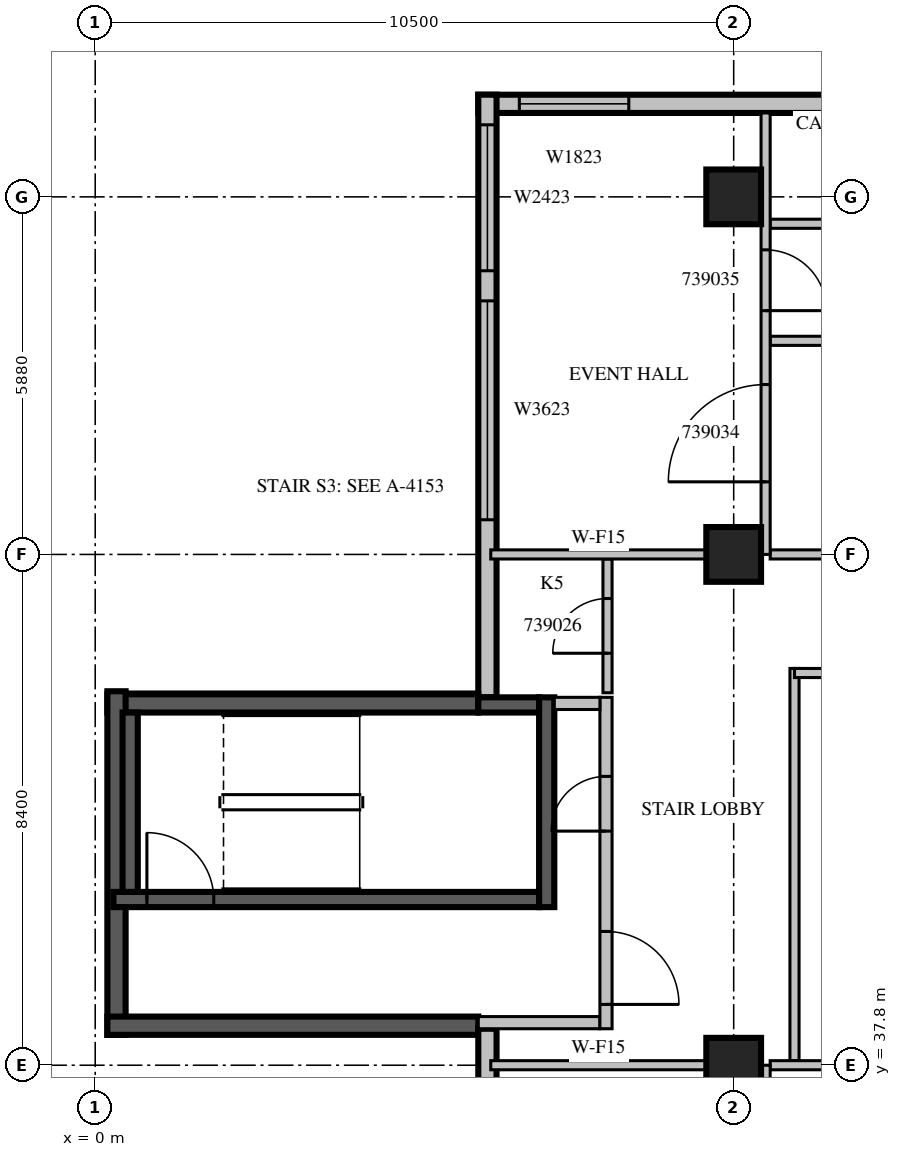
"""IFC4 building model, lengths in metres.
Left out: names, types, materials, properties, quantities, classifications, styles, units other than length and angle.
Written with IfcOpenShell. Run it as: python <this file> out.ifc"""

import sys

from ifc_helpers import new_model, si_unit, direction, frame, frame_2d, origin, origin_2d, place, context, subcontext, project, spatial, rectangle, extrude, source, transform, mapped, element, fill, save


model = new_model("IFC4")
c1 = context("Model", 3, precision=1e-05, world=origin(), true_north=direction((0.0, 1.0)))
c2 = subcontext(c1, "Body", "Model", "MODEL_VIEW")
j1 = project(units=[si_unit("LENGTHUNIT", "METRE"), si_unit("PLANEANGLEUNIT", "RADIAN")], contexts=[c1])
p1 = place(None, origin())
s1 = spatial("IfcSite", under=j1, at=p1, CompositionType="ELEMENT")
p2 = place(p1, origin())
s2 = spatial("IfcBuilding", under=s1, at=p2, CompositionType="ELEMENT")
p3 = place(p2, frame((0.0, 0.0, 181.6)))
s3 = spatial("IfcBuildingStorey", under=s2, at=p3, CompositionType="ELEMENT", Elevation=181.6)
m1 = source(origin(), c2, "Body", "SweptSolid", [
    extrude(rectangle(XDim=0.9, YDim=0.9, at=origin_2d()), origin(), (0.0, 0.0, 1.0), 3.8),
])
for number, where, z_axis, x_axis in (
    (1, (10.5, 37.8, 0.0), (0.0, 0.0, 1.0), (1.0, 0.0, 0.0)),
    (2, (10.5, 46.2, 0.0), (0.0, 0.0, 1.0), (1.0, 0.0, 0.0)),
    (3, (10.5, 52.08, 0.0), (0.0, 0.0, 1.0), (1.0, 0.0, 0.0)),
):
    element("IfcColumn", number, at=place(p3, frame(where, z_axis=z_axis, x_axis=x_axis)), inside=s3, PredefinedType="COLUMN", context=c2, shape_type="MappedRepresentation", body=[
        mapped(m1, transform((0.0, 0.0, 0.0), scale=1.0)),
    ])
m2 = source(origin(), c2, "Body", "SweptSolid", [
    extrude(rectangle(XDim=10.5, YDim=0.3, at=frame_2d((5.25, 0.0))), origin(), (0.0, 0.0, 1.0), 3.4),
])
p4 = place(p3, frame((16.8, 53.61, 0.0), z_axis=(0.0, 0.0, 1.0), x_axis=(-1.0, 0.0, 0.0)))
e4 = element("IfcWall", 4, at=p4, inside=s3, PredefinedType="STANDARD", context=c2, shape_type="MappedRepresentation", body=[
    mapped(m2, transform((0.0, 0.0, 0.0), scale=1.0)),
])
m3 = source(origin(), c2, "Body", "SweptSolid", [
    extrude(rectangle(XDim=1.2, YDim=2.3, at=frame_2d((0.6, 1.15))), frame((0.0, 0.16, 0.0), z_axis=(0.0, -1.0, 0.0), x_axis=(1.0, 0.0, 0.0)), (0.0, 0.0, 1.0), 0.32),
])
p5 = place(p4, frame((2.15, 0.0, 0.6)))
e5 = element("IfcOpeningElement", 5, at=p5, cuts=e4, PredefinedType="OPENING", context=c2, shape_type="MappedRepresentation", body=[
    mapped(m3, transform((0.0, 0.0, 0.0), scale=1.0)),
])
m4 = source(origin(), c2, "Body", "SweptSolid", [
    extrude(rectangle(XDim=1.8, YDim=2.3, at=frame_2d((0.9, 1.15))), frame((0.0, 0.16, 0.0), z_axis=(0.0, -1.0, 0.0), x_axis=(1.0, 0.0, 0.0)), (0.0, 0.0, 1.0), 0.32),
])
p6 = place(p4, frame((8.025, 0.0, 0.6)))
e6 = element("IfcOpeningElement", 6, at=p6, cuts=e4, PredefinedType="OPENING", context=c2, shape_type="MappedRepresentation", body=[
    mapped(m4, transform((0.0, 0.0, 0.0), scale=1.0)),
])
m5 = source(origin(), c2, "Body", "SweptSolid", [
    extrude(rectangle(XDim=9.91, YDim=0.3, at=frame_2d((4.955, 0.0))), origin(), (0.0, 0.0, 1.0), 3.4),
])
p7 = place(p3, frame((6.45, 53.76, 0.0), z_axis=(0.0, 0.0, 1.0), x_axis=(0.0, -1.0, 0.0)))
e7 = element("IfcWall", 7, at=p7, inside=s3, PredefinedType="STANDARD", context=c2, shape_type="MappedRepresentation", body=[
    mapped(m5, transform((0.0, 0.0, 0.0), scale=1.0)),
])
m6 = source(origin(), c2, "Body", "SweptSolid", [
    extrude(rectangle(XDim=3.6, YDim=2.3, at=frame_2d((1.8, 1.15))), frame((0.0, 0.16, 0.0), z_axis=(0.0, -1.0, 0.0), x_axis=(1.0, 0.0, 0.0)), (0.0, 0.0, 1.0), 0.32),
])
p8 = place(p7, frame((3.39, 0.0, 0.6)))
e8 = element("IfcOpeningElement", 8, at=p8, cuts=e7, PredefinedType="OPENING", context=c2, shape_type="MappedRepresentation", body=[
    mapped(m6, transform((0.0, 0.0, 0.0), scale=1.0)),
])
m7 = source(origin(), c2, "Body", "SweptSolid", [
    extrude(rectangle(XDim=2.4, YDim=2.3, at=frame_2d((1.2, 1.15))), frame((0.0, 0.16, 0.0), z_axis=(0.0, -1.0, 0.0), x_axis=(1.0, 0.0, 0.0)), (0.0, 0.0, 1.0), 0.32),
])
p9 = place(p7, frame((0.495, 0.0, 0.6)))
e9 = element("IfcOpeningElement", 9, at=p9, cuts=e7, PredefinedType="OPENING", context=c2, shape_type="MappedRepresentation", body=[
    mapped(m7, transform((0.0, 0.0, 0.0), scale=1.0)),
])
m8 = source(origin(), c2, "Body", "SweptSolid", [
    extrude(rectangle(XDim=6.1, YDim=0.3, at=frame_2d((3.05, 0.0))), origin(), (0.0, 0.0, 1.0), 3.4),
])
p10 = place(p3, frame((6.3, 43.75, 0.0), z_axis=(0.0, 0.0, 1.0), x_axis=(-1.0, 0.0, 0.0)))
e10 = element("IfcWall", 10, at=p10, inside=s3, PredefinedType="SOLIDWALL", context=c2, shape_type="MappedRepresentation", body=[
    mapped(m8, transform((0.0, 0.0, 0.0), scale=1.0)),
])
m9 = source(origin(), c2, "Body", "SweptSolid", [
    extrude(rectangle(XDim=5.65, YDim=0.3, at=frame_2d((2.825, 0.0))), origin(), (0.0, 0.0, 1.0), 3.4),
])
p11 = place(p3, frame((0.35, 43.95, 0.0), z_axis=(0.0, 0.0, 1.0), x_axis=(0.0, -1.0, 0.0)))
e11 = element("IfcWall", 11, at=p11, inside=s3, PredefinedType="SOLIDWALL", context=c2, shape_type="MappedRepresentation", body=[
    mapped(m9, transform((0.0, 0.0, 0.0), scale=1.0)),
])
p12 = place(p3, frame((0.2, 38.45, 0.0), z_axis=(0.0, 0.0, 1.0), x_axis=(1.0, 0.0, 0.0)))
e12 = element("IfcWall", 12, at=p12, inside=s3, PredefinedType="SOLIDWALL", context=c2, shape_type="MappedRepresentation", body=[
    mapped(m8, transform((0.0, 0.0, 0.0), scale=1.0)),
])
m10 = source(origin(), c2, "Body", "SweptSolid", [
    extrude(rectangle(XDim=4.2, YDim=0.3, at=frame_2d((2.1, 0.0))), origin(), (0.0, 0.0, 1.0), 3.4),
])
p13 = place(p3, frame((6.45, 38.4, 0.0), z_axis=(0.0, 0.0, 1.0), x_axis=(0.0, -1.0, 0.0)))
e13 = element("IfcWall", 13, at=p13, inside=s3, PredefinedType="STANDARD", context=c2, shape_type="MappedRepresentation", body=[
    mapped(m10, transform((0.0, 0.0, 0.0), scale=1.0)),
])
p14 = place(p13, frame((1.15, 0.0, 0.6)))
e14 = element("IfcOpeningElement", 14, at=p14, cuts=e13, PredefinedType="OPENING", context=c2, shape_type="MappedRepresentation", body=[
    mapped(m4, transform((0.0, 0.0, 0.0), scale=1.0)),
])
m11 = source(origin(), c2, "Body", "SweptSolid", [
    extrude(rectangle(XDim=7.0, YDim=0.25, at=frame_2d((3.5, 0.0))), origin(), (0.0, 0.0, 1.0), 3.4),
])
p15 = place(p3, frame((0.3, 40.525, 0.0), z_axis=(0.0, 0.0, 1.0), x_axis=(1.0, 0.0, 0.0)))
e15 = element("IfcWall", 15, at=p15, inside=s3, PredefinedType="SOLIDWALL", context=c2, shape_type="MappedRepresentation", body=[
    mapped(m11, transform((0.0, 0.0, 0.0), scale=1.0)),
])
m12 = source(origin(), c2, "Body", "SweptSolid", [
    extrude(rectangle(XDim=1.1, YDim=2.1, at=frame_2d((0.55, 1.05))), frame((0.0, 0.135, 0.0), z_axis=(0.0, -1.0, 0.0), x_axis=(1.0, 0.0, 0.0)), (0.0, 0.0, 1.0), 0.27),
])
p16 = place(p15, frame((0.55, 0.0, 0.0)))
e16 = element("IfcOpeningElement", 16, at=p16, cuts=e15, PredefinedType="OPENING", context=c2, shape_type="MappedRepresentation", body=[
    mapped(m12, transform((0.0, 0.0, 0.0), scale=1.0)),
])
m13 = source(origin(), c2, "Body", "SweptSolid", [
    extrude(rectangle(XDim=1.0, YDim=0.25, at=frame_2d((0.5, 0.0))), origin(), (0.0, 0.0, 1.0), 3.4),
])
p17 = place(p3, frame((6.3, 43.725, 0.0), z_axis=(0.0, 0.0, 1.0), x_axis=(1.0, 0.0, 0.0)))
e17 = element("IfcWall", 17, at=p17, inside=s3, PredefinedType="SOLIDWALL", context=c2, shape_type="MappedRepresentation", body=[
    mapped(m13, transform((0.0, 0.0, 0.0), scale=1.0)),
])
m14 = source(origin(), c2, "Body", "SweptSolid", [
    extrude(rectangle(XDim=3.45, YDim=0.25, at=frame_2d((1.725, 0.0))), origin(), (0.0, 0.0, 1.0), 3.4),
])
p18 = place(p3, frame((7.425, 40.4, 0.0), z_axis=(0.0, 0.0, 1.0), x_axis=(0.0, 1.0, 0.0)))
e18 = element("IfcWall", 18, at=p18, inside=s3, PredefinedType="SOLIDWALL", context=c2, shape_type="MappedRepresentation", body=[
    mapped(m14, transform((0.0, 0.0, 0.0), scale=1.0)),
])
m15 = source(origin(), c2, "Body", "SweptSolid", [
    extrude(rectangle(XDim=2.95, YDim=0.25, at=frame_2d((1.475, 0.0))), origin(), (0.0, 0.0, 1.0), 3.4),
])
p19 = place(p3, frame((0.575, 40.65, 0.0), z_axis=(0.0, 0.0, 1.0), x_axis=(0.0, 1.0, 0.0)))
e19 = element("IfcWall", 19, at=p19, inside=s3, PredefinedType="SOLIDWALL", context=c2, shape_type="MappedRepresentation", body=[
    mapped(m15, transform((0.0, 0.0, 0.0), scale=1.0)),
])
m16 = source(origin(), c2, "Body", "SweptSolid", [
    extrude(rectangle(XDim=2.0, YDim=0.2, at=frame_2d((1.0, 0.0))), origin(), (0.0, 0.0, 1.0), 3.4),
])
p20 = place(p3, frame((6.3, 38.5, 0.0), z_axis=(0.0, 0.0, 1.0), x_axis=(1.0, 0.0, 0.0)))
e20 = element("IfcWall", 20, at=p20, inside=s3, PredefinedType="PARTITIONING", context=c2, shape_type="MappedRepresentation", body=[
    mapped(m16, transform((0.0, 0.0, 0.0), scale=1.0)),
])
m17 = source(origin(), c2, "Body", "SweptSolid", [
    extrude(rectangle(XDim=5.45, YDim=0.2, at=frame_2d((2.725, 0.0))), origin(), (0.0, 0.0, 1.0), 3.4),
])
p21 = place(p3, frame((8.4, 38.4, 0.0), z_axis=(0.0, 0.0, 1.0), x_axis=(0.0, 1.0, 0.0)))
e21 = element("IfcWall", 21, at=p21, inside=s3, PredefinedType="PARTITIONING", context=c2, shape_type="MappedRepresentation", body=[
    mapped(m17, transform((0.0, 0.0, 0.0), scale=1.0)),
])
m18 = source(origin(), c2, "Body", "SweptSolid", [
    extrude(rectangle(XDim=1.2, YDim=2.1, at=frame_2d((0.6, 1.05))), frame((0.0, 0.11, 0.0), z_axis=(0.0, -1.0, 0.0), x_axis=(1.0, 0.0, 0.0)), (0.0, 0.0, 1.0), 0.22),
])
p22 = place(p21, frame((0.4, 0.0, 0.0)))
e22 = element("IfcOpeningElement", 22, at=p22, cuts=e21, PredefinedType="OPENING", context=c2, shape_type="MappedRepresentation", body=[
    mapped(m18, transform((0.0, 0.0, 0.0), scale=1.0)),
])
m19 = source(origin(), c2, "Body", "SweptSolid", [
    extrude(rectangle(XDim=0.9, YDim=2.1, at=frame_2d((0.45, 1.05))), frame((0.0, 0.11, 0.0), z_axis=(0.0, -1.0, 0.0), x_axis=(1.0, 0.0, 0.0)), (0.0, 0.0, 1.0), 0.22),
])
p23 = place(p21, frame((3.25, 0.0, 0.0)))
e23 = element("IfcOpeningElement", 23, at=p23, cuts=e21, PredefinedType="OPENING", context=c2, shape_type="MappedRepresentation", body=[
    mapped(m19, transform((0.0, 0.0, 0.0), scale=1.0)),
])
m20 = source(origin(), c2, "Body", "SweptSolid", [
    extrude(rectangle(XDim=0.75, YDim=0.2, at=frame_2d((0.375, 0.0))), origin(), (0.0, 0.0, 1.0), 3.4),
])
p24 = place(p3, frame((7.55, 43.75, 0.0), z_axis=(0.0, 0.0, 1.0), x_axis=(1.0, 0.0, 0.0)))
e24 = element("IfcWall", 24, at=p24, inside=s3, PredefinedType="PARTITIONING", context=c2, shape_type="MappedRepresentation", body=[
    mapped(m20, transform((0.0, 0.0, 0.0), scale=1.0)),
])
m21 = source(origin(), c2, "Body", "SweptSolid", [
    extrude(rectangle(XDim=6.45, YDim=0.15, at=frame_2d((3.225, 0.0))), origin(), (0.0, 0.0, 1.0), 3.4),
])
p25 = place(p3, frame((11.5, 44.325, 0.0), z_axis=(0.0, 0.0, 1.0), x_axis=(0.0, -1.0, 0.0)))
e25 = element("IfcWall", 25, at=p25, inside=s3, PredefinedType="PARTITIONING", context=c2, shape_type="MappedRepresentation", body=[
    mapped(m21, transform((0.0, 0.0, 0.0), scale=1.0)),
])
m22 = source(origin(), c2, "Body", "SweptSolid", [
    extrude(rectangle(XDim=3.575, YDim=0.15, at=frame_2d((1.788, 0.0))), origin(), (0.0, 0.0, 1.0), 3.4),
])
p26 = place(p3, frame((15.075, 44.25, 0.0), z_axis=(0.0, 0.0, 1.0), x_axis=(-1.0, 0.0, 0.0)))
e26 = element("IfcWall", 26, at=p26, inside=s3, PredefinedType="PARTITIONING", context=c2, shape_type="MappedRepresentation", body=[
    mapped(m22, transform((0.0, 0.0, 0.0), scale=1.0)),
])
m23 = source(origin(), c2, "Body", "SweptSolid", [
    extrude(rectangle(XDim=2.2, YDim=0.15, at=frame_2d((1.1, 0.0))), origin(), (0.0, 0.0, 1.0), 3.4),
])
p27 = place(p3, frame((8.425, 43.925, 0.0), z_axis=(0.0, 0.0, 1.0), x_axis=(0.0, 1.0, 0.0)))
e27 = element("IfcWall", 27, at=p27, inside=s3, PredefinedType="PARTITIONING", context=c2, shape_type="MappedRepresentation", body=[
    mapped(m23, transform((0.0, 0.0, 0.0), scale=1.0)),
])
m24 = source(origin(), c2, "Body", "SweptSolid", [
    extrude(rectangle(XDim=0.9, YDim=2.1, at=frame_2d((0.45, 1.05))), frame((0.0, 0.085, 0.0), z_axis=(0.0, -1.0, 0.0), x_axis=(1.0, 0.0, 0.0)), (0.0, 0.0, 1.0), 0.17),
])
p28 = place(p27, frame((0.65, 0.0, 0.0)))
e28 = element("IfcOpeningElement", 28, at=p28, cuts=e27, PredefinedType="OPENING", context=c2, shape_type="MappedRepresentation", body=[
    mapped(m24, transform((0.0, 0.0, 0.0), scale=1.0)),
])
m25 = source(origin(), c2, "Body", "SweptSolid", [
    extrude(rectangle(XDim=3.546, YDim=0.15, at=frame_2d((1.773, 0.0))), origin(), (0.0, 0.0, 1.0), 3.4),
])
p29 = place(p3, frame((10.051, 37.8, 0.0), z_axis=(0.0, 0.0, 1.0), x_axis=(-1.0, 0.0, 0.0)))
e29 = element("IfcWall", 29, at=p29, inside=s3, PredefinedType="PARTITIONING", context=c2, shape_type="MappedRepresentation", body=[
    mapped(m25, transform((0.0, 0.0, 0.0), scale=1.0)),
])
m26 = source(origin(), c2, "Body", "SweptSolid", [
    extrude(rectangle(XDim=3.9, YDim=0.15, at=frame_2d((1.95, 0.0))), origin(), (0.0, 0.0, 1.0), 3.4),
])
p30 = place(p3, frame((15.0, 37.8, 0.0), z_axis=(0.0, 0.0, 1.0), x_axis=(-1.0, 0.0, 0.0)))
e30 = element("IfcWall", 30, at=p30, inside=s3, PredefinedType="PARTITIONING", context=c2, shape_type="MappedRepresentation", body=[
    mapped(m26, transform((0.0, 0.0, 0.0), scale=1.0)),
])
m27 = source(origin(), c2, "Body", "SweptSolid", [
    extrude(rectangle(XDim=8.4, YDim=0.15, at=frame_2d((4.2, 0.0))), origin(), (0.0, 0.0, 1.0), 3.4),
])
p31 = place(p3, frame((11.025, 29.4, 0.0), z_axis=(0.0, 0.0, 1.0), x_axis=(0.0, 1.0, 0.0)))
e31 = element("IfcWall", 31, at=p31, inside=s3, PredefinedType="PARTITIONING", context=c2, shape_type="MappedRepresentation", body=[
    mapped(m27, transform((0.0, 0.0, 0.0), scale=1.0)),
])
p32 = place(p31, frame((1.418, 0.0, 0.0)))
e32 = element("IfcOpeningElement", 32, at=p32, cuts=e31, PredefinedType="OPENING", context=c2, shape_type="MappedRepresentation", body=[
    mapped(m24, transform((0.0, 0.0, 0.0), scale=1.0)),
])
p33 = place(p31, frame((0.46, 0.0, 0.0)))
e33 = element("IfcOpeningElement", 33, at=p33, cuts=e31, PredefinedType="OPENING", context=c2, shape_type="MappedRepresentation", body=[
    mapped(m24, transform((0.0, 0.0, 0.0), scale=1.0)),
])
p34 = place(p31, frame((4.525, 0.0, 0.0)))
e34 = element("IfcOpeningElement", 34, at=p34, cuts=e31, PredefinedType="OPENING", context=c2, shape_type="MappedRepresentation", body=[
    mapped(m24, transform((0.0, 0.0, 0.0), scale=1.0)),
])
p35 = place(p31, frame((6.387, 0.0, 0.0)))
e35 = element("IfcOpeningElement", 35, at=p35, cuts=e31, PredefinedType="OPENING", context=c2, shape_type="MappedRepresentation", body=[
    mapped(m24, transform((0.0, 0.0, 0.0), scale=1.0)),
])
p36 = place(p3, frame((15.0, 49.713, 0.0), z_axis=(0.0, 0.0, 1.0), x_axis=(-1.0, 0.0, 0.0)))
e36 = element("IfcWall", 36, at=p36, inside=s3, PredefinedType="PARTITIONING", context=c2, shape_type="MappedRepresentation", body=[
    mapped(m26, transform((0.0, 0.0, 0.0), scale=1.0)),
])
p37 = place(p3, frame((15.0, 51.638, 0.0), z_axis=(0.0, 0.0, 1.0), x_axis=(-1.0, 0.0, 0.0)))
e37 = element("IfcWall", 37, at=p37, inside=s3, PredefinedType="PARTITIONING", context=c2, shape_type="MappedRepresentation", body=[
    mapped(m26, transform((0.0, 0.0, 0.0), scale=1.0)),
])
p38 = place(p37, frame((1.5, 0.0, 0.0)))
e38 = element("IfcOpeningElement", 38, at=p38, cuts=e37, PredefinedType="OPENING", context=c2, shape_type="MappedRepresentation", body=[
    mapped(m24, transform((0.0, 0.0, 0.0), scale=1.0)),
])
p39 = place(p3, frame((10.051, 46.2, 0.0), z_axis=(0.0, 0.0, 1.0), x_axis=(-1.0, 0.0, 0.0)))
e39 = element("IfcWall", 39, at=p39, inside=s3, PredefinedType="PARTITIONING", context=c2, shape_type="MappedRepresentation", body=[
    mapped(m25, transform((0.0, 0.0, 0.0), scale=1.0)),
])
p40 = place(p3, frame((15.0, 46.2, 0.0), z_axis=(0.0, 0.0, 1.0), x_axis=(-1.0, 0.0, 0.0)))
e40 = element("IfcWall", 40, at=p40, inside=s3, PredefinedType="PARTITIONING", context=c2, shape_type="MappedRepresentation", body=[
    mapped(m26, transform((0.0, 0.0, 0.0), scale=1.0)),
])
m28 = source(origin(), c2, "Body", "SweptSolid", [
    extrude(rectangle(XDim=7.26, YDim=0.15, at=frame_2d((3.63, 0.0))), origin(), (0.0, 0.0, 1.0), 3.4),
])
p41 = place(p3, frame((11.025, 46.2, 0.0), z_axis=(0.0, 0.0, 1.0), x_axis=(0.0, 1.0, 0.0)))
e41 = element("IfcWall", 41, at=p41, inside=s3, PredefinedType="PARTITIONING", context=c2, shape_type="MappedRepresentation", body=[
    mapped(m28, transform((0.0, 0.0, 0.0), scale=1.0)),
])
m29 = source(origin(), c2, "Body", "SweptSolid", [
    extrude(rectangle(XDim=1.6, YDim=2.1, at=frame_2d((0.8, 1.05))), frame((0.0, 0.085, 0.0), z_axis=(0.0, -1.0, 0.0), x_axis=(1.0, 0.0, 0.0)), (0.0, 0.0, 1.0), 0.17),
])
p42 = place(p41, frame((1.194, 0.0, 0.0)))
e42 = element("IfcOpeningElement", 42, at=p42, cuts=e41, PredefinedType="OPENING", context=c2, shape_type="MappedRepresentation", body=[
    mapped(m29, transform((0.0, 0.0, 0.0), scale=1.0)),
])
m30 = source(origin(), c2, "Body", "SweptSolid", [
    extrude(rectangle(XDim=1.0, YDim=2.1, at=frame_2d((0.5, 1.05))), frame((0.0, 0.085, 0.0), z_axis=(0.0, -1.0, 0.0), x_axis=(1.0, 0.0, 0.0)), (0.0, 0.0, 1.0), 0.17),
])
p43 = place(p41, frame((4.009, 0.0, 0.0)))
e43 = element("IfcOpeningElement", 43, at=p43, cuts=e41, PredefinedType="OPENING", context=c2, shape_type="MappedRepresentation", body=[
    mapped(m30, transform((0.0, 0.0, 0.0), scale=1.0)),
])
m31 = source(origin(), c2, "Body", "SweptSolid", [
    extrude(rectangle(XDim=1.8, YDim=2.3, at=frame_2d((0.9, 1.15))), frame((0.0, 0.03, 0.0), z_axis=(0.0, -1.0, 0.0), x_axis=(1.0, 0.0, 0.0)), (0.0, 0.0, 1.0), 0.06),
])
p44 = place(p6, origin())
e44 = element("IfcWindow", 44, at=p44, inside=s3, PartitioningType="SINGLE_PANEL", PredefinedType="WINDOW", context=c2, shape_type="MappedRepresentation", body=[
    mapped(m31, transform((0.0, 0.0, 0.0), scale=1.0)),
])
fill(e6, e44)
m32 = source(origin(), c2, "Body", "SweptSolid", [
    extrude(rectangle(XDim=3.6, YDim=2.3, at=frame_2d((1.8, 1.15))), frame((0.0, 0.03, 0.0), z_axis=(0.0, -1.0, 0.0), x_axis=(1.0, 0.0, 0.0)), (0.0, 0.0, 1.0), 0.06),
])
p45 = place(p8, origin())
e45 = element("IfcWindow", 45, at=p45, inside=s3, PartitioningType="SINGLE_PANEL", PredefinedType="WINDOW", context=c2, shape_type="MappedRepresentation", body=[
    mapped(m32, transform((0.0, 0.0, 0.0), scale=1.0)),
])
fill(e8, e45)
m33 = source(origin(), c2, "Body", "SweptSolid", [
    extrude(rectangle(XDim=2.4, YDim=2.3, at=frame_2d((1.2, 1.15))), frame((0.0, 0.03, 0.0), z_axis=(0.0, -1.0, 0.0), x_axis=(1.0, 0.0, 0.0)), (0.0, 0.0, 1.0), 0.06),
])
p46 = place(p9, origin())
e46 = element("IfcWindow", 46, at=p46, inside=s3, PartitioningType="SINGLE_PANEL", PredefinedType="WINDOW", context=c2, shape_type="MappedRepresentation", body=[
    mapped(m33, transform((0.0, 0.0, 0.0), scale=1.0)),
])
fill(e9, e46)
m34 = source(origin(), c2, "Body", "SweptSolid", [
    extrude(rectangle(XDim=1.1, YDim=2.1, at=frame_2d((0.55, 1.05))), frame((0.0, 0.025, 0.0), z_axis=(0.0, -1.0, 0.0), x_axis=(1.0, 0.0, 0.0)), (0.0, 0.0, 1.0), 0.05),
])
p47 = place(p16, origin())
e47 = element("IfcDoor", 47, at=p47, inside=s3, OperationType="SINGLE_SWING_LEFT", PredefinedType="DOOR", context=c2, shape_type="MappedRepresentation", body=[
    mapped(m34, transform((0.0, 0.0, 0.0), scale=1.0)),
])
fill(e16, e47)
m35 = source(origin(), c2, "Body", "SweptSolid", [
    extrude(rectangle(XDim=1.2, YDim=2.1, at=frame_2d((0.6, 1.05))), frame((0.0, 0.025, 0.0), z_axis=(0.0, -1.0, 0.0), x_axis=(1.0, 0.0, 0.0)), (0.0, 0.0, 1.0), 0.05),
])
p48 = place(p22, origin())
e48 = element("IfcDoor", 48, at=p48, inside=s3, OperationType="SINGLE_SWING_RIGHT", PredefinedType="DOOR", context=c2, shape_type="MappedRepresentation", body=[
    mapped(m35, transform((0.0, 0.0, 0.0), scale=1.0)),
])
fill(e22, e48)
m36 = source(origin(), c2, "Body", "SweptSolid", [
    extrude(rectangle(XDim=0.9, YDim=2.1, at=frame_2d((0.45, 1.05))), frame((0.0, 0.025, 0.0), z_axis=(0.0, -1.0, 0.0), x_axis=(1.0, 0.0, 0.0)), (0.0, 0.0, 1.0), 0.05),
])
p49 = place(p23, origin())
e49 = element("IfcDoor", 49, at=p49, inside=s3, OperationType="SINGLE_SWING_LEFT", PredefinedType="DOOR", context=c2, shape_type="MappedRepresentation", body=[
    mapped(m36, transform((0.0, 0.0, 0.0), scale=1.0)),
])
fill(e23, e49)
p50 = place(p28, origin())
e50 = element("IfcDoor", 50, at=p50, inside=s3, OperationType="SINGLE_SWING_LEFT", PredefinedType="DOOR", context=c2, shape_type="MappedRepresentation", body=[
    mapped(m36, transform((0.0, 0.0, 0.0), scale=1.0)),
])
fill(e28, e50)
m37 = source(origin(), c2, "Body", "SweptSolid", [
    extrude(rectangle(XDim=1.6, YDim=2.1, at=frame_2d((0.8, 1.05))), frame((0.0, 0.025, 0.0), z_axis=(0.0, -1.0, 0.0), x_axis=(1.0, 0.0, 0.0)), (0.0, 0.0, 1.0), 0.05),
])
p51 = place(p42, origin())
e51 = element("IfcDoor", 51, at=p51, inside=s3, OperationType="SINGLE_SWING_LEFT", PredefinedType="DOOR", context=c2, shape_type="MappedRepresentation", body=[
    mapped(m37, transform((0.0, 0.0, 0.0), scale=1.0)),
])
fill(e42, e51)
m38 = source(origin(), c2, "Body", "SweptSolid", [
    extrude(rectangle(XDim=1.0, YDim=2.1, at=frame_2d((0.5, 1.05))), frame((0.0, 0.025, 0.0), z_axis=(0.0, -1.0, 0.0), x_axis=(1.0, 0.0, 0.0)), (0.0, 0.0, 1.0), 0.05),
])
p52 = place(p43, origin())
e52 = element("IfcDoor", 52, at=p52, inside=s3, OperationType="SINGLE_SWING_RIGHT", PredefinedType="DOOR", context=c2, shape_type="MappedRepresentation", body=[
    mapped(m38, transform((0.0, 0.0, 0.0), scale=1.0)),
])
fill(e43, e52)
save(model, sys.argv[1])
